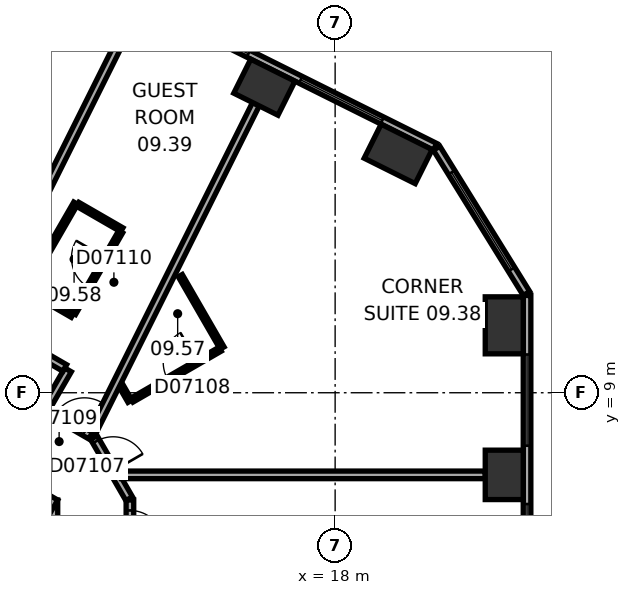
"""IFC4 building model, lengths in metres.
Left out: names, types, materials, properties, quantities, classifications, styles, units other than length and angle.
Written with IfcOpenShell. Run it as: python <this file> out.ifc"""

import sys

from ifc_helpers import new_model, si_unit, direction, frame, frame_2d, origin, origin_2d, place, context, subcontext, project, spatial, rectangle, extrude, element, fill, save


model = new_model("IFC4")
c1 = context("Model", 3, precision=1e-05, world=origin(), true_north=direction((0.0, 1.0)))
c2 = subcontext(c1, "Body", "Model", "MODEL_VIEW")
j1 = project(units=[si_unit("LENGTHUNIT", "METRE"), si_unit("PLANEANGLEUNIT", "RADIAN")], contexts=[c1])
p1 = place(None, origin())
s1 = spatial("IfcSite", under=j1, at=p1, CompositionType="ELEMENT")
p2 = place(p1, origin())
s2 = spatial("IfcBuilding", under=s1, at=p2, CompositionType="ELEMENT")
p3 = place(p2, frame((0.0, 0.0, 50.6)))
s3 = spatial("IfcBuildingStorey", under=s2, at=p3, CompositionType="ELEMENT", Elevation=50.6)
p4 = place(p3, frame((22.45, 6.839, 0.0), z_axis=(0.0, 0.0, 1.0), x_axis=(0.0, 1.0, 0.0)))
e1 = element("IfcColumn", 1, at=p4, inside=s3, PredefinedType="COLUMN", context=c2, shape_type="SweptSolid", body=[
    extrude(rectangle(XDim=1.3, YDim=1.0, at=origin_2d()), origin(), (0.0, 0.0, 1.0), 3.3),
])
for number, where, z_axis, x_axis in (
    (2, (22.45, 10.774, 0.0), (0.0, 0.0, 1.0), (0.0, 1.0, 0.0)),
    (3, (19.659, 15.284, 0.0), (0.0, 0.0, 1.0), (-0.895, 0.446, 0.0)),
):
    element("IfcColumn", number, at=place(p3, frame(where, z_axis=z_axis, x_axis=x_axis)), inside=s3, PredefinedType="COLUMN", context=c2, shape_type="SweptSolid", body=[
        extrude(rectangle(XDim=1.5, YDim=1.0, at=origin_2d()), origin(), (0.0, 0.0, 1.0), 3.3),
    ])
p5 = place(p3, frame((16.138, 17.04, 0.0), z_axis=(0.0, 0.0, 1.0), x_axis=(-0.894934361602, 0.44619781311, 0.0)))
e4 = element("IfcColumn", 4, at=p5, inside=s3, PredefinedType="COLUMN", context=c2, shape_type="SweptSolid", body=[
    extrude(rectangle(XDim=1.3, YDim=1.0, at=origin_2d()), origin(), (0.0, 0.0, 1.0), 3.3),
])
p6 = place(p3, frame((10.1, -6.177, 0.0), z_axis=(0.0, 0.0, 1.0), x_axis=(0.0, 1.0, 0.0)))
e5 = element("IfcWall", 5, at=p6, inside=s3, PredefinedType="SHEAR", context=c2, shape_type="SweptSolid", body=[
    extrude(rectangle(XDim=12.355, YDim=1.2, at=frame_2d((6.177, 0.0))), origin(), (0.0, 0.0, 1.0), 3.3),
])
p7 = place(p6, frame((6.378, 0.0, 0.0)))
e6 = element("IfcOpeningElement", 6, at=p7, cuts=e5, PredefinedType="OPENING", context=c2, shape_type="SweptSolid", body=[
    extrude(rectangle(XDim=1.5, YDim=2.1, at=frame_2d((0.75, 1.05))), frame((0.0, 0.61, 0.0), z_axis=(0.0, -1.0, 0.0), x_axis=(1.0, 0.0, 0.0)), (0.0, 0.0, 1.0), 1.22),
])
p8 = place(p6, frame((1.828, 0.0, 0.0)))
e7 = element("IfcOpeningElement", 7, at=p8, cuts=e5, PredefinedType="OPENING", context=c2, shape_type="SweptSolid", body=[
    extrude(rectangle(XDim=1.1, YDim=2.1, at=frame_2d((0.55, 1.05))), frame((0.0, 0.61, 0.0), z_axis=(0.0, -1.0, 0.0), x_axis=(1.0, 0.0, 0.0)), (0.0, 0.0, 1.0), 1.22),
])
p9 = place(p6, frame((4.427, 0.0, 0.0)))
e8 = element("IfcOpeningElement", 8, at=p9, cuts=e5, PredefinedType="OPENING", context=c2, shape_type="SweptSolid", body=[
    extrude(rectangle(XDim=1.1, YDim=2.1, at=frame_2d((0.55, 1.05))), frame((0.0, 0.61, 0.0), z_axis=(0.0, -1.0, 0.0), x_axis=(1.0, 0.0, 0.0)), (0.0, 0.0, 1.0), 1.22),
])
p10 = place(p3, frame((10.4, 5.658, 0.0), z_axis=(0.0, 0.0, 1.0), x_axis=(-0.866021384402, 0.500006961711, 0.0)))
e9 = element("IfcWall", 9, at=p10, inside=s3, PredefinedType="SHEAR", context=c2, shape_type="SweptSolid", body=[
    extrude(rectangle(XDim=12.355, YDim=1.2, at=frame_2d((6.178, 0.0))), origin(), (0.0, 0.0, 1.0), 3.3),
])
p11 = place(p10, frame((2.728, 0.0, 0.0)))
e10 = element("IfcOpeningElement", 10, at=p11, cuts=e9, PredefinedType="OPENING", context=c2, shape_type="SweptSolid", body=[
    extrude(rectangle(XDim=1.1, YDim=2.1, at=frame_2d((0.55, 1.05))), frame((0.0, 0.61, 0.0), z_axis=(0.0, -1.0, 0.0), x_axis=(1.0, 0.0, 0.0)), (0.0, 0.0, 1.0), 1.22),
])
p12 = place(p10, frame((5.328, 0.0, 0.0)))
e11 = element("IfcOpeningElement", 11, at=p12, cuts=e9, PredefinedType="OPENING", context=c2, shape_type="SweptSolid", body=[
    extrude(rectangle(XDim=1.1, YDim=2.1, at=frame_2d((0.55, 1.05))), frame((0.0, 0.61, 0.0), z_axis=(0.0, -1.0, 0.0), x_axis=(1.0, 0.0, 0.0)), (0.0, 0.0, 1.0), 1.22),
])
p13 = place(p10, frame((7.928, 0.0, 0.0)))
e12 = element("IfcOpeningElement", 12, at=p13, cuts=e9, PredefinedType="OPENING", context=c2, shape_type="SweptSolid", body=[
    extrude(rectangle(XDim=1.1, YDim=2.1, at=frame_2d((0.55, 1.05))), frame((0.0, 0.61, 0.0), z_axis=(0.0, -1.0, 0.0), x_axis=(1.0, 0.0, 0.0)), (0.0, 0.0, 1.0), 1.22),
])
p14 = place(p3, frame((23.05, -9.687, 0.0), z_axis=(0.0, 0.0, 1.0), x_axis=(0.0, 1.0, 0.0)))
e13 = element("IfcWall", 13, at=p14, inside=s3, PredefinedType="STANDARD", context=c2, shape_type="SweptSolid", body=[
    extrude(rectangle(XDim=21.246, YDim=0.2, at=frame_2d((10.623, 0.0))), origin(), (0.0, 0.0, 1.0), 3.3),
])
p15 = place(p14, frame((1.555, 0.0, 0.8)))
e14 = element("IfcOpeningElement", 14, at=p15, cuts=e13, PredefinedType="OPENING", context=c2, shape_type="SweptSolid", body=[
    extrude(rectangle(XDim=2.4, YDim=1.7, at=frame_2d((1.2, 0.85))), frame((0.0, 0.11, 0.0), z_axis=(0.0, -1.0, 0.0), x_axis=(1.0, 0.0, 0.0)), (0.0, 0.0, 1.0), 0.22),
])
p16 = place(p14, frame((5.489, 0.0, 0.8)))
e15 = element("IfcOpeningElement", 15, at=p16, cuts=e13, PredefinedType="OPENING", context=c2, shape_type="SweptSolid", body=[
    extrude(rectangle(XDim=2.4, YDim=1.7, at=frame_2d((1.2, 0.85))), frame((0.0, 0.11, 0.0), z_axis=(0.0, -1.0, 0.0), x_axis=(1.0, 0.0, 0.0)), (0.0, 0.0, 1.0), 0.22),
])
p17 = place(p14, frame((9.424, 0.0, 0.8)))
e16 = element("IfcOpeningElement", 16, at=p17, cuts=e13, PredefinedType="OPENING", context=c2, shape_type="SweptSolid", body=[
    extrude(rectangle(XDim=2.4, YDim=1.7, at=frame_2d((1.2, 0.85))), frame((0.0, 0.11, 0.0), z_axis=(0.0, -1.0, 0.0), x_axis=(1.0, 0.0, 0.0)), (0.0, 0.0, 1.0), 0.22),
])
p18 = place(p14, frame((13.358, 0.0, 0.8)))
e17 = element("IfcOpeningElement", 17, at=p18, cuts=e13, PredefinedType="OPENING", context=c2, shape_type="SweptSolid", body=[
    extrude(rectangle(XDim=2.4, YDim=1.7, at=frame_2d((1.2, 0.85))), frame((0.0, 0.11, 0.0), z_axis=(0.0, -1.0, 0.0), x_axis=(1.0, 0.0, 0.0)), (0.0, 0.0, 1.0), 0.22),
])
p19 = place(p14, frame((17.293, 0.0, 0.8)))
e18 = element("IfcOpeningElement", 18, at=p19, cuts=e13, PredefinedType="OPENING", context=c2, shape_type="SweptSolid", body=[
    extrude(rectangle(XDim=2.4, YDim=1.7, at=frame_2d((1.2, 0.85))), frame((0.0, 0.11, 0.0), z_axis=(0.0, -1.0, 0.0), x_axis=(1.0, 0.0, 0.0)), (0.0, 0.0, 1.0), 0.22),
])
p20 = place(p3, frame((23.035, 11.612, 0.0), z_axis=(0.0, 0.0, 1.0), x_axis=(-0.526160091227, 0.850385535155, 0.0)))
e19 = element("IfcWall", 19, at=p20, inside=s3, PredefinedType="STANDARD", context=c2, shape_type="SweptSolid", body=[
    extrude(rectangle(XDim=4.494, YDim=0.2, at=frame_2d((2.247, 0.0))), origin(), (0.0, 0.0, 1.0), 3.3),
])
p21 = place(p20, frame((0.747, 0.0, 0.8)))
e20 = element("IfcOpeningElement", 20, at=p21, cuts=e19, PredefinedType="OPENING", context=c2, shape_type="SweptSolid", body=[
    extrude(rectangle(XDim=3.0, YDim=1.7, at=frame_2d((1.5, 0.85))), frame((0.0, 0.11, 0.0), z_axis=(0.0, -1.0, 0.0), x_axis=(1.0, 0.0, 0.0)), (0.0, 0.0, 1.0), 0.22),
])
p22 = place(p3, frame((20.63, 15.47, 0.0), z_axis=(0.0, 0.0, 1.0), x_axis=(-0.894934518609, 0.446197498203, 0.0)))
e21 = element("IfcWall", 21, at=p22, inside=s3, PredefinedType="STANDARD", context=c2, shape_type="SweptSolid", body=[
    extrude(rectangle(XDim=21.246, YDim=0.2, at=frame_2d((10.623, 0.0))), origin(), (0.0, 0.0, 1.0), 3.3),
])
p23 = place(p22, frame((1.553, 0.0, 0.8)))
e22 = element("IfcOpeningElement", 22, at=p23, cuts=e21, PredefinedType="OPENING", context=c2, shape_type="SweptSolid", body=[
    extrude(rectangle(XDim=2.4, YDim=1.7, at=frame_2d((1.2, 0.85))), frame((0.0, 0.11, 0.0), z_axis=(0.0, -1.0, 0.0), x_axis=(1.0, 0.0, 0.0)), (0.0, 0.0, 1.0), 0.22),
])
p24 = place(p22, frame((5.488, 0.0, 0.8)))
e23 = element("IfcOpeningElement", 23, at=p24, cuts=e21, PredefinedType="OPENING", context=c2, shape_type="SweptSolid", body=[
    extrude(rectangle(XDim=2.4, YDim=1.7, at=frame_2d((1.2, 0.85))), frame((0.0, 0.11, 0.0), z_axis=(0.0, -1.0, 0.0), x_axis=(1.0, 0.0, 0.0)), (0.0, 0.0, 1.0), 0.22),
])
p25 = place(p22, frame((9.422, 0.0, 0.8)))
e24 = element("IfcOpeningElement", 24, at=p25, cuts=e21, PredefinedType="OPENING", context=c2, shape_type="SweptSolid", body=[
    extrude(rectangle(XDim=2.4, YDim=1.7, at=frame_2d((1.2, 0.85))), frame((0.0, 0.11, 0.0), z_axis=(0.0, -1.0, 0.0), x_axis=(1.0, 0.0, 0.0)), (0.0, 0.0, 1.0), 0.22),
])
p26 = place(p22, frame((13.357, 0.0, 0.8)))
e25 = element("IfcOpeningElement", 25, at=p26, cuts=e21, PredefinedType="OPENING", context=c2, shape_type="SweptSolid", body=[
    extrude(rectangle(XDim=2.4, YDim=1.7, at=frame_2d((1.2, 0.85))), frame((0.0, 0.11, 0.0), z_axis=(0.0, -1.0, 0.0), x_axis=(1.0, 0.0, 0.0)), (0.0, 0.0, 1.0), 0.22),
])
p27 = place(p22, frame((17.292, 0.0, 0.8)))
e26 = element("IfcOpeningElement", 26, at=p27, cuts=e21, PredefinedType="OPENING", context=c2, shape_type="SweptSolid", body=[
    extrude(rectangle(XDim=2.4, YDim=1.7, at=frame_2d((1.2, 0.85))), frame((0.0, 0.11, 0.0), z_axis=(0.0, -1.0, 0.0), x_axis=(1.0, 0.0, 0.0)), (0.0, 0.0, 1.0), 0.22),
])
p28 = place(p3, frame((9.875, 11.736, 0.0), z_axis=(0.0, 0.0, 1.0), x_axis=(0.499936506574, 0.866062058628, 0.0)))
e27 = element("IfcWall", 27, at=p28, inside=s3, PredefinedType="PARTITIONING", context=c2, shape_type="SweptSolid", body=[
    extrude(rectangle(XDim=2.6, YDim=0.12, at=frame_2d((1.3, 0.0))), origin(), (0.0, 0.0, 1.0), 3.05),
])
p29 = place(p3, frame((10.371, 8.561, 0.0), z_axis=(0.0, 0.0, 1.0), x_axis=(0.499986357472, 0.866033280158, 0.0)))
e28 = element("IfcWall", 28, at=p29, inside=s3, PredefinedType="PARTITIONING", context=c2, shape_type="SweptSolid", body=[
    extrude(rectangle(XDim=1.201, YDim=0.2, at=frame_2d((0.601, 0.0))), origin(), (0.0, 0.0, 1.0), 3.05),
])
p30 = place(p3, frame((10.885, 9.652, 0.0), z_axis=(0.0, 0.0, 1.0), x_axis=(-0.866033868542, 0.499985338323, 0.0)))
e29 = element("IfcWall", 29, at=p30, inside=s3, PredefinedType="PARTITIONING", context=c2, shape_type="SweptSolid", body=[
    extrude(rectangle(XDim=8.602, YDim=0.2, at=frame_2d((4.301, 0.0))), origin(), (0.0, 0.0, 1.0), 3.05),
])
p31 = place(p30, frame((5.069, 0.0, 0.0)))
e30 = element("IfcOpeningElement", 30, at=p31, cuts=e29, PredefinedType="OPENING", context=c2, shape_type="SweptSolid", body=[
    extrude(rectangle(XDim=1.0, YDim=2.1, at=frame_2d((0.5, 1.05))), frame((0.0, 0.11, 0.0), z_axis=(0.0, -1.0, 0.0), x_axis=(1.0, 0.0, 0.0)), (0.0, 0.0, 1.0), 0.22),
])
for number, where, z_axis, x_axis in (
    (31, (11.087, 11.036, 0.0), (0.0, 0.0, 1.0), (-0.866, 0.5, 0.0)),
    (32, (11.226, 13.958, 0.0), (0.0, 0.0, 1.0), (0.866, -0.5, 0.0)),
):
    element("IfcWall", number, at=place(p3, frame(where, z_axis=z_axis, x_axis=x_axis)), inside=s3, PredefinedType="PARTITIONING", context=c2, shape_type="SweptSolid", body=[
        extrude(rectangle(XDim=1.34, YDim=0.12, at=frame_2d((0.67, 0.0))), origin(), (0.0, 0.0, 1.0), 3.05),
    ])
p32 = place(p3, frame((11.566, 7.871, 0.0), z_axis=(0.0, 0.0, 1.0), x_axis=(-0.866004557827, 0.500036104519, 0.0)))
e33 = element("IfcWall", 33, at=p32, inside=s3, PredefinedType="PARTITIONING", context=c2, shape_type="SweptSolid", body=[
    extrude(rectangle(XDim=1.28, YDim=0.2, at=frame_2d((0.64, 0.0))), origin(), (0.0, 0.0, 1.0), 3.05),
])
p33 = place(p32, frame((0.19, 0.0, 0.0)))
e34 = element("IfcOpeningElement", 34, at=p33, cuts=e33, PredefinedType="OPENING", context=c2, shape_type="SweptSolid", body=[
    extrude(rectangle(XDim=0.9, YDim=2.1, at=frame_2d((0.45, 1.05))), frame((0.0, 0.11, 0.0), z_axis=(0.0, -1.0, 0.0), x_axis=(1.0, 0.0, 0.0)), (0.0, 0.0, 1.0), 0.22),
])
p34 = place(p3, frame((12.357, 13.236, 0.0), z_axis=(0.0, 0.0, 1.0), x_axis=(-0.50000366821, -0.866023285932, 0.0)))
e35 = element("IfcWall", 35, at=p34, inside=s3, PredefinedType="PARTITIONING", context=c2, shape_type="SweptSolid", body=[
    extrude(rectangle(XDim=2.48, YDim=0.12, at=frame_2d((1.24, 0.0))), origin(), (0.0, 0.0, 1.0), 3.05),
])
p35 = place(p34, frame((0.79, 0.0, 0.0)))
e36 = element("IfcOpeningElement", 36, at=p35, cuts=e35, PredefinedType="OPENING", context=c2, shape_type="SweptSolid", body=[
    extrude(rectangle(XDim=0.9, YDim=2.1, at=frame_2d((0.45, 1.05))), frame((0.0, 0.07, 0.0), z_axis=(0.0, -1.0, 0.0), x_axis=(1.0, 0.0, 0.0)), (0.0, 0.0, 1.0), 0.14),
])
p36 = place(p3, frame((12.393, 18.348, 0.0), z_axis=(0.0, 0.0, 1.0), x_axis=(-0.446176022699, -0.894945225569, 0.0)))
e37 = element("IfcWall", 37, at=p36, inside=s3, PredefinedType="PARTITIONING", context=c2, shape_type="SweptSolid", body=[
    extrude(rectangle(XDim=8.191, YDim=0.2, at=frame_2d((4.095, 0.0))), origin(), (0.0, 0.0, 1.0), 2.6),
])
p37 = place(p3, frame((12.58, 6.212, 0.0), z_axis=(0.0, 0.0, 1.0), x_axis=(-0.500063286585, 0.865988862174, 0.0)))
e38 = element("IfcWall", 38, at=p37, inside=s3, PredefinedType="PARTITIONING", context=c2, shape_type="SweptSolid", body=[
    extrude(rectangle(XDim=1.86, YDim=0.2, at=frame_2d((0.93, 0.0))), origin(), (0.0, 0.0, 1.0), 3.05),
])
p38 = place(p37, frame((0.842, 0.0, 0.0)))
e39 = element("IfcOpeningElement", 39, at=p38, cuts=e38, PredefinedType="OPENING", context=c2, shape_type="SweptSolid", body=[
    extrude(rectangle(XDim=0.9, YDim=2.1, at=frame_2d((0.45, 1.05))), frame((0.0, 0.11, 0.0), z_axis=(0.0, -1.0, 0.0), x_axis=(1.0, 0.0, 0.0)), (0.0, 0.0, 1.0), 0.22),
])
p39 = place(p3, frame((12.6, 3.004, 0.0), z_axis=(0.0, 0.0, 1.0), x_axis=(0.0, 1.0, 0.0)))
e40 = element("IfcWall", 40, at=p39, inside=s3, PredefinedType="PARTITIONING", context=c2, shape_type="SweptSolid", body=[
    extrude(rectangle(XDim=3.173, YDim=0.2, at=frame_2d((1.586, 0.0))), origin(), (0.0, 0.0, 1.0), 3.05),
])
p40 = place(p39, frame((1.998, 0.0, 0.0)))
e41 = element("IfcOpeningElement", 41, at=p40, cuts=e40, PredefinedType="OPENING", context=c2, shape_type="SweptSolid", body=[
    extrude(rectangle(XDim=0.9, YDim=2.1, at=frame_2d((0.45, 1.05))), frame((0.0, 0.11, 0.0), z_axis=(0.0, -1.0, 0.0), x_axis=(1.0, 0.0, 0.0)), (0.0, 0.0, 1.0), 0.22),
])
p41 = place(p3, frame((12.601, 8.776, 0.0), z_axis=(0.0, 0.0, 1.0), x_axis=(-0.500166486798, 0.865929261247, 0.0)))
e42 = element("IfcWall", 42, at=p41, inside=s3, PredefinedType="PARTITIONING", context=c2, shape_type="SweptSolid", body=[
    extrude(rectangle(XDim=0.476, YDim=0.12, at=frame_2d((0.238, 0.0))), origin(), (0.0, 0.0, 1.0), 3.05),
])
p42 = place(p3, frame((13.926, 12.081, 0.0), z_axis=(0.0, 0.0, 1.0), x_axis=(0.499994660107, -0.866028486751, 0.0)))
e43 = element("IfcWall", 43, at=p42, inside=s3, PredefinedType="PARTITIONING", context=c2, shape_type="SweptSolid", body=[
    extrude(rectangle(XDim=2.2, YDim=0.12, at=frame_2d((1.1, 0.0))), origin(), (0.0, 0.0, 1.0), 3.05),
])
p43 = place(p3, frame((14.974, 10.146, 0.0), z_axis=(0.0, 0.0, 1.0), x_axis=(-0.86599746015, -0.500048396672, 0.0)))
e44 = element("IfcWall", 44, at=p43, inside=s3, PredefinedType="PARTITIONING", context=c2, shape_type="SweptSolid", body=[
    extrude(rectangle(XDim=2.68, YDim=0.12, at=frame_2d((1.34, 0.0))), origin(), (0.0, 0.0, 1.0), 3.05),
])
p44 = place(p43, frame((0.69, 0.0, 0.0)))
e45 = element("IfcOpeningElement", 45, at=p44, cuts=e44, PredefinedType="OPENING", context=c2, shape_type="SweptSolid", body=[
    extrude(rectangle(XDim=0.9, YDim=2.1, at=frame_2d((0.45, 1.05))), frame((0.0, 0.07, 0.0), z_axis=(0.0, -1.0, 0.0), x_axis=(1.0, 0.0, 0.0)), (0.0, 0.0, 1.0), 0.14),
])
p45 = place(p3, frame((15.915, 16.592, 0.0), z_axis=(0.0, 0.0, 1.0), x_axis=(-0.446199736347, -0.894933402709, 0.0)))
e46 = element("IfcWall", 46, at=p45, inside=s3, PredefinedType="PARTITIONING", context=c2, shape_type="SweptSolid", body=[
    extrude(rectangle(XDim=9.635, YDim=0.2, at=frame_2d((4.817, 0.0))), origin(), (0.0, 0.0, 1.0), 3.05),
])
p46 = place(p3, frame((21.95, 6.839, 0.0), z_axis=(0.0, 0.0, 1.0), x_axis=(-1.0, 0.0, 0.0)))
e47 = element("IfcWall", 47, at=p46, inside=s3, PredefinedType="PARTITIONING", context=c2, shape_type="SweptSolid", body=[
    extrude(rectangle(XDim=9.572, YDim=0.2, at=frame_2d((4.786, 0.0))), origin(), (0.0, 0.0, 1.0), 3.05),
])
p47 = place(p18, origin())
e48 = element("IfcWindow", 48, at=p47, inside=s3, PartitioningType="SINGLE_PANEL", PredefinedType="WINDOW", context=c2, shape_type="SweptSolid", body=[
    extrude(rectangle(XDim=2.4, YDim=1.7, at=frame_2d((1.2, 0.85))), frame((0.0, 0.03, 0.0), z_axis=(0.0, -1.0, 0.0), x_axis=(1.0, 0.0, 0.0)), (0.0, 0.0, 1.0), 0.06),
])
fill(e17, e48)
p48 = place(p19, origin())
e49 = element("IfcWindow", 49, at=p48, inside=s3, PartitioningType="SINGLE_PANEL", PredefinedType="WINDOW", context=c2, shape_type="SweptSolid", body=[
    extrude(rectangle(XDim=2.4, YDim=1.7, at=frame_2d((1.2, 0.85))), frame((0.0, 0.03, 0.0), z_axis=(0.0, -1.0, 0.0), x_axis=(1.0, 0.0, 0.0)), (0.0, 0.0, 1.0), 0.06),
])
fill(e18, e49)
p49 = place(p21, origin())
e50 = element("IfcWindow", 50, at=p49, inside=s3, PartitioningType="SINGLE_PANEL", PredefinedType="WINDOW", context=c2, shape_type="SweptSolid", body=[
    extrude(rectangle(XDim=3.0, YDim=1.7, at=frame_2d((1.5, 0.85))), frame((0.0, 0.03, 0.0), z_axis=(0.0, -1.0, 0.0), x_axis=(1.0, 0.0, 0.0)), (0.0, 0.0, 1.0), 0.06),
])
fill(e20, e50)
p50 = place(p23, origin())
e51 = element("IfcWindow", 51, at=p50, inside=s3, PartitioningType="SINGLE_PANEL", PredefinedType="WINDOW", context=c2, shape_type="SweptSolid", body=[
    extrude(rectangle(XDim=2.4, YDim=1.7, at=frame_2d((1.2, 0.85))), frame((0.0, 0.03, 0.0), z_axis=(0.0, -1.0, 0.0), x_axis=(1.0, 0.0, 0.0)), (0.0, 0.0, 1.0), 0.06),
])
fill(e22, e51)
p51 = place(p24, origin())
e52 = element("IfcWindow", 52, at=p51, inside=s3, PartitioningType="SINGLE_PANEL", PredefinedType="WINDOW", context=c2, shape_type="SweptSolid", body=[
    extrude(rectangle(XDim=2.4, YDim=1.7, at=frame_2d((1.2, 0.85))), frame((0.0, 0.03, 0.0), z_axis=(0.0, -1.0, 0.0), x_axis=(1.0, 0.0, 0.0)), (0.0, 0.0, 1.0), 0.06),
])
fill(e23, e52)
p52 = place(p40, origin())
e53 = element("IfcDoor", 53, at=p52, inside=s3, OperationType="SINGLE_SWING_LEFT", PredefinedType="DOOR", context=c2, shape_type="SweptSolid", body=[
    extrude(rectangle(XDim=0.9, YDim=2.1, at=frame_2d((0.45, 1.05))), frame((0.0, 0.025, 0.0), z_axis=(0.0, -1.0, 0.0), x_axis=(1.0, 0.0, 0.0)), (0.0, 0.0, 1.0), 0.05),
])
fill(e41, e53)
p53 = place(p38, origin())
e54 = element("IfcDoor", 54, at=p53, inside=s3, OperationType="SINGLE_SWING_LEFT", PredefinedType="DOOR", context=c2, shape_type="SweptSolid", body=[
    extrude(rectangle(XDim=0.9, YDim=2.1, at=frame_2d((0.45, 1.05))), frame((0.0, 0.025, 0.0), z_axis=(0.0, -1.0, 0.0), x_axis=(1.0, 0.0, 0.0)), (0.0, 0.0, 1.0), 0.05),
])
fill(e39, e54)
p54 = place(p44, origin())
e55 = element("IfcDoor", 55, at=p54, inside=s3, OperationType="SINGLE_SWING_LEFT", PredefinedType="DOOR", context=c2, shape_type="SweptSolid", body=[
    extrude(rectangle(XDim=0.9, YDim=2.1, at=frame_2d((0.45, 1.05))), frame((0.0, 0.025, 0.0), z_axis=(0.0, -1.0, 0.0), x_axis=(1.0, 0.0, 0.0)), (0.0, 0.0, 1.0), 0.05),
])
fill(e45, e55)
p55 = place(p33, origin())
e56 = element("IfcDoor", 56, at=p55, inside=s3, OperationType="SINGLE_SWING_LEFT", PredefinedType="DOOR", context=c2, shape_type="SweptSolid", body=[
    extrude(rectangle(XDim=0.9, YDim=2.1, at=frame_2d((0.45, 1.05))), frame((0.0, 0.025, 0.0), z_axis=(0.0, -1.0, 0.0), x_axis=(1.0, 0.0, 0.0)), (0.0, 0.0, 1.0), 0.05),
])
fill(e34, e56)
p56 = place(p35, origin())
e57 = element("IfcDoor", 57, at=p56, inside=s3, OperationType="SINGLE_SWING_LEFT", PredefinedType="DOOR", context=c2, shape_type="SweptSolid", body=[
    extrude(rectangle(XDim=0.9, YDim=2.1, at=frame_2d((0.45, 1.05))), frame((0.0, 0.025, 0.0), z_axis=(0.0, -1.0, 0.0), x_axis=(1.0, 0.0, 0.0)), (0.0, 0.0, 1.0), 0.05),
])
fill(e36, e57)
save(model, sys.argv[1])
